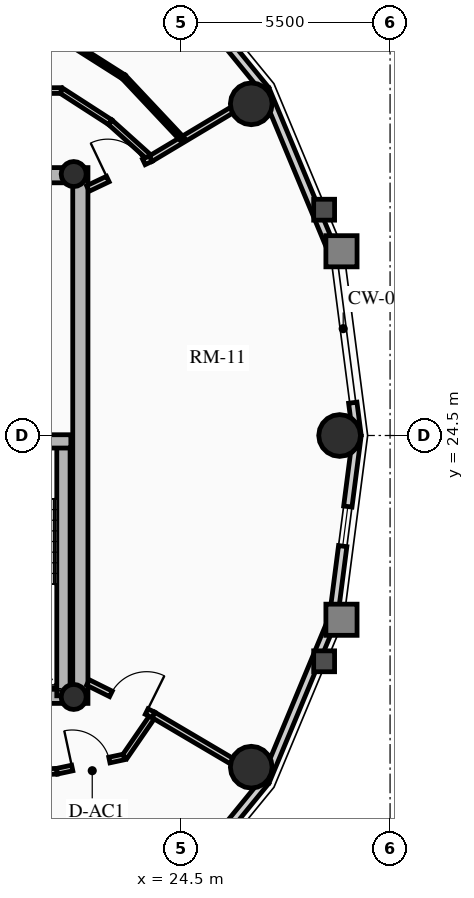
"""IFC4 building model, lengths in metres.
Left out: names, types, materials, properties, quantities, classifications, styles, units other than length and angle.
Written with IfcOpenShell. Run it as: python <this file> out.ifc"""

import sys

from ifc_helpers import new_model, si_unit, direction, frame, frame_2d, origin, origin_2d, place, context, subcontext, project, spatial, rectangle, circle, hollow_circle, extrude, source, transform, mapped, element, fill, save


model = new_model("IFC4")
c1 = context("Model", 3, precision=1e-05, world=origin(), true_north=direction((0.0, 1.0)))
c2 = subcontext(c1, "Body", "Model", "MODEL_VIEW")
j1 = project(units=[si_unit("LENGTHUNIT", "METRE"), si_unit("PLANEANGLEUNIT", "RADIAN")], contexts=[c1])
p1 = place(None, origin())
s1 = spatial("IfcSite", under=j1, at=p1, CompositionType="ELEMENT")
p2 = place(p1, origin())
s2 = spatial("IfcBuilding", under=s1, at=p2, CompositionType="ELEMENT")
p3 = place(p2, frame((0.0, 0.0, 226.05)))
s3 = spatial("IfcBuildingStorey", under=s2, at=p3, CompositionType="ELEMENT", Elevation=226.05)
p4 = place(p3, frame((21.85, 17.45, 0.0), z_axis=(0.0, 0.0, 1.0), x_axis=(0.0, 1.0, 0.0)))
e1 = element("IfcWall", 1, at=p4, inside=s3, PredefinedType="SHEAR", context=c2, shape_type="SweptSolid", body=[
    extrude(rectangle(XDim=14.1, YDim=0.4, at=frame_2d((7.05, 0.0))), origin(), (0.0, 0.0, 1.0), 3.2),
])
p5 = place(p3, frame((11.15, 17.65, 0.0), z_axis=(0.0, 0.0, 1.0), x_axis=(1.0, 0.0, 0.0)))
e2 = element("IfcWall", 2, at=p5, inside=s3, PredefinedType="SHEAR", context=c2, shape_type="SweptSolid", body=[
    extrude(rectangle(XDim=10.7, YDim=0.4, at=frame_2d((5.35, 0.0))), origin(), (0.0, 0.0, 1.0), 3.2),
])
m1 = source(origin(), c2, "Body", "SweptSolid", [
    extrude(rectangle(XDim=1.5, YDim=2.02, at=frame_2d((0.75, 1.01))), frame((0.0, 0.21, 0.0), z_axis=(0.0, -1.0, 0.0), x_axis=(1.0, 0.0, 0.0)), (0.0, 0.0, 1.0), 0.42),
])
p6 = place(p5, frame((5.45, 0.0, 0.0)))
e3 = element("IfcOpeningElement", 3, at=p6, cuts=e2, PredefinedType="OPENING", context=c2, shape_type="MappedRepresentation", body=[
    mapped(m1, transform((0.0, 0.0, 0.0), x_axis=(1.0, 0.0, 0.0), y_axis=(0.0, 1.0, 0.0), z_axis=(0.0, 0.0, 1.0), scale=1.0)),
])
p7 = place(p3, frame((11.15, 31.35, 0.0), z_axis=(0.0, 0.0, 1.0), x_axis=(1.0, 0.0, 0.0)))
e4 = element("IfcWall", 4, at=p7, inside=s3, PredefinedType="SHEAR", context=c2, shape_type="SweptSolid", body=[
    extrude(rectangle(XDim=10.7, YDim=0.4, at=frame_2d((5.35, 0.0))), origin(), (0.0, 0.0, 1.0), 3.2),
])
p8 = place(p7, frame((4.6, 0.0, 0.0)))
e5 = element("IfcOpeningElement", 5, at=p8, cuts=e4, PredefinedType="OPENING", context=c2, shape_type="MappedRepresentation", body=[
    mapped(m1, transform((0.0, 0.0, 0.0), x_axis=(1.0, 0.0, 0.0), y_axis=(0.0, 1.0, 0.0), z_axis=(0.0, 0.0, 1.0), scale=1.0)),
])
p9 = place(p3, frame((21.405, 17.65, 0.0), z_axis=(0.0, 0.0, 1.0), x_axis=(0.0, 1.0, 0.0)))
e6 = element("IfcWall", 6, at=p9, inside=s3, PredefinedType="SHEAR", context=c2, shape_type="SweptSolid", body=[
    extrude(rectangle(XDim=6.695, YDim=0.35, at=frame_2d((3.348, 0.0))), origin(), (0.0, 0.0, 1.0), 3.2),
])
p10 = place(p3, frame((18.315, 24.345, 0.0), z_axis=(0.0, 0.0, 1.0), x_axis=(1.0, 0.0, 0.0)))
e7 = element("IfcWall", 7, at=p10, inside=s3, PredefinedType="SHEAR", context=c2, shape_type="SweptSolid", body=[
    extrude(rectangle(XDim=3.285, YDim=0.35, at=frame_2d((1.643, 0.0))), origin(), (0.0, 0.0, 1.0), 3.2),
])
for number, where, z_axis, x_axis in (
    (8, (21.675, 17.62, 0.0), (0.0, 0.0, 1.0), (1.0, 0.0, 0.0)),
    (9, (21.675, 31.38, 0.0), (0.0, 0.0, 1.0), (1.0, 0.0, 0.0)),
):
    element("IfcColumn", number, at=place(p3, frame(where, z_axis=z_axis, x_axis=x_axis)), inside=s3, PredefinedType="COLUMN", context=c2, shape_type="SweptSolid", body=[
        extrude(hollow_circle(Radius=0.33, WallThickness=0.025, at=origin_2d()), origin(), (0.0, 0.0, 1.0), 3.2),
    ])
for number, where, z_axis, x_axis in (
    (10, (28.672, 24.5, 0.0), (0.0, 0.0, 1.0), (1.0, 0.0, 0.0)),
    (11, (26.347, 33.229, 0.0), (0.0, 0.0, 1.0), (1.0, 0.0, 0.0)),
    (12, (26.347, 15.771, 0.0), (0.0, 0.0, 1.0), (1.0, 0.0, 0.0)),
):
    element("IfcColumn", number, at=place(p3, frame(where, z_axis=z_axis, x_axis=x_axis)), inside=s3, PredefinedType="USERDEFINED", context=c2, shape_type="SweptSolid", body=[
        extrude(circle(Radius=0.55, at=origin_2d()), origin(), (0.0, 0.0, 1.0), 3.2),
    ])
p11 = place(p3, frame((29.018, 25.363, 0.0), z_axis=(0.0, 0.0, 1.0), x_axis=(0.128247365719, -0.991742211054, 0.0)))
e13 = element("IfcWall", 13, at=p11, inside=s3, PredefinedType="SOLIDWALL", context=c2, shape_type="SweptSolid", body=[
    extrude(rectangle(XDim=0.87, YDim=0.22, at=frame_2d((0.435, 0.0))), origin(), (0.0, 0.0, 1.0), 2.612),
])
p12 = place(p3, frame((26.718, 33.593, 0.0), z_axis=(0.0, 0.0, 1.0), x_axis=(0.384036305194, -0.923317993052, 0.0)))
e14 = element("IfcWall", 14, at=p12, inside=s3, PredefinedType="SOLIDWALL", context=c2, shape_type="SweptSolid", body=[
    extrude(rectangle(XDim=4.671, YDim=0.22, at=frame_2d((2.335, 0.0))), origin(), (0.0, 0.0, 1.0), 2.612),
])
p13 = place(p3, frame((23.924, 37.015, 0.0), z_axis=(0.0, 0.0, 1.0), x_axis=(0.632467166636, -0.774587169483, 0.0)))
e15 = element("IfcWall", 15, at=p13, inside=s3, PredefinedType="SOLIDWALL", context=c2, shape_type="SweptSolid", body=[
    extrude(rectangle(XDim=4.418, YDim=0.22, at=frame_2d((2.209, 0.0))), origin(), (0.0, 0.0, 1.0), 2.612),
])
m2 = source(origin(), c2, "Body", "SweptSolid", [
    extrude(rectangle(XDim=1.05, YDim=1.3, at=frame_2d((0.525, 0.65))), frame((0.0, 0.12, 0.0), z_axis=(0.0, -1.0, 0.0), x_axis=(1.0, 0.0, 0.0)), (0.0, 0.0, 1.0), 0.24),
])
p14 = place(p13, frame((1.684, 0.0, 0.65)))
e16 = element("IfcOpeningElement", 16, at=p14, cuts=e15, PredefinedType="OPENING", context=c2, shape_type="MappedRepresentation", body=[
    mapped(m2, transform((0.0, 0.0, 0.0), x_axis=(1.0, 0.0, 0.0), y_axis=(0.0, 1.0, 0.0), z_axis=(0.0, 0.0, 1.0), scale=1.0)),
])
p15 = place(p3, frame((26.718, 15.407, 0.0), z_axis=(0.0, 0.0, 1.0), x_axis=(-0.632467166636, -0.774587169483, 0.0)))
e17 = element("IfcWall", 17, at=p15, inside=s3, PredefinedType="SOLIDWALL", context=c2, shape_type="SweptSolid", body=[
    extrude(rectangle(XDim=4.418, YDim=0.22, at=frame_2d((2.209, 0.0))), origin(), (0.0, 0.0, 1.0), 2.612),
])
p16 = place(p15, frame((1.684, 0.0, 0.65)))
e18 = element("IfcOpeningElement", 18, at=p16, cuts=e17, PredefinedType="OPENING", context=c2, shape_type="MappedRepresentation", body=[
    mapped(m2, transform((0.0, 0.0, 0.0), x_axis=(1.0, 0.0, 0.0), y_axis=(0.0, 1.0, 0.0), z_axis=(0.0, 0.0, 1.0), scale=1.0)),
])
p17 = place(p3, frame((28.512, 19.719, 0.0), z_axis=(0.0, 0.0, 1.0), x_axis=(-0.384036305194, -0.923317993052, 0.0)))
e19 = element("IfcWall", 19, at=p17, inside=s3, PredefinedType="SOLIDWALL", context=c2, shape_type="SweptSolid", body=[
    extrude(rectangle(XDim=4.671, YDim=0.22, at=frame_2d((2.335, 0.0))), origin(), (0.0, 0.0, 1.0), 2.612),
])
p18 = place(p3, frame((29.13, 24.5, 0.0), z_axis=(0.0, 0.0, 1.0), x_axis=(-0.128241318541, -0.991742993027, 0.0)))
e20 = element("IfcWall", 20, at=p18, inside=s3, PredefinedType="SOLIDWALL", context=c2, shape_type="SweptSolid", body=[
    extrude(rectangle(XDim=4.82, YDim=0.22, at=frame_2d((2.41, 0.0))), origin(), (0.0, 0.0, 1.0), 2.612),
])
p19 = place(p18, frame((1.885, 0.0, 0.65)))
e21 = element("IfcOpeningElement", 21, at=p19, cuts=e20, PredefinedType="OPENING", context=c2, shape_type="MappedRepresentation", body=[
    mapped(m2, transform((0.0, 0.0, 0.0), x_axis=(1.0, 0.0, 0.0), y_axis=(0.0, 1.0, 0.0), z_axis=(0.0, 0.0, 1.0), scale=1.0)),
])
p20 = place(p3, frame((23.701, 31.786, 0.0), z_axis=(0.0, 0.0, 1.0), x_axis=(-0.743742806382, 0.668465883913, 0.0)))
e22 = element("IfcWall", 22, at=p20, inside=s3, PredefinedType="PARTITIONING", context=c2, shape_type="SweptSolid", body=[
    extrude(rectangle(XDim=1.434, YDim=0.15, at=frame_2d((0.717, 0.0))), origin(), (0.0, 0.0, 1.0), 2.612),
])
p21 = place(p3, frame((22.635, 32.744, 0.0), z_axis=(0.0, 0.0, 1.0), x_axis=(-0.840119270642, 0.542401706391, 0.0)))
e23 = element("IfcWall", 23, at=p21, inside=s3, PredefinedType="PARTITIONING", context=c2, shape_type="SweptSolid", body=[
    extrude(rectangle(XDim=1.538, YDim=0.15, at=frame_2d((0.769, 0.0))), origin(), (0.0, 0.0, 1.0), 2.545),
])
p22 = place(p3, frame((21.344, 33.578, 0.0), z_axis=(0.0, 0.0, 1.0), x_axis=(-0.999984243152, -0.005613684, 0.0)))
e24 = element("IfcWall", 24, at=p22, inside=s3, PredefinedType="PARTITIONING", context=c2, shape_type="SweptSolid", body=[
    extrude(rectangle(XDim=3.262, YDim=0.15, at=frame_2d((1.631, 0.0))), origin(), (0.0, 0.0, 1.0), 2.612),
])
m3 = source(origin(), c2, "Body", "SweptSolid", [
    extrude(rectangle(XDim=1.05, YDim=2.015, at=frame_2d((0.525, 1.007))), frame((0.0, 0.085, 0.0), z_axis=(0.0, -1.0, 0.0), x_axis=(1.0, 0.0, 0.0)), (0.0, 0.0, 1.0), 0.17),
])
p23 = place(p22, frame((1.599, 0.0, 0.0)))
e25 = element("IfcOpeningElement", 25, at=p23, cuts=e24, PredefinedType="OPENING", context=c2, shape_type="MappedRepresentation", body=[
    mapped(m3, transform((0.0, 0.0, 0.0), x_axis=(1.0, 0.0, 0.0), y_axis=(0.0, 1.0, 0.0), z_axis=(0.0, 0.0, 1.0), scale=1.0)),
])
p24 = place(p3, frame((14.845, 15.441, 0.0), z_axis=(0.0, 0.0, 1.0), x_axis=(0.99938794868, 0.034981824334, 0.0)))
e26 = element("IfcWall", 26, at=p24, inside=s3, PredefinedType="PARTITIONING", context=c2, shape_type="SweptSolid", body=[
    extrude(rectangle(XDim=6.393, YDim=0.15, at=frame_2d((3.196, 0.0))), origin(), (0.0, 0.0, 1.0), 2.545),
])
p25 = place(p3, frame((21.234, 15.664, 0.0), z_axis=(0.0, 0.0, 1.0), x_axis=(0.977931581182, 0.208925399431, 0.0)))
e27 = element("IfcWall", 27, at=p25, inside=s3, PredefinedType="PARTITIONING", context=c2, shape_type="SweptSolid", body=[
    extrude(rectangle(XDim=1.823, YDim=0.15, at=frame_2d((0.912, 0.0))), origin(), (0.0, 0.0, 1.0), 2.545),
])
m4 = source(origin(), c2, "Body", "SweptSolid", [
    extrude(rectangle(XDim=1.0, YDim=2.015, at=frame_2d((0.5, 1.007))), frame((0.0, 0.085, 0.0), z_axis=(0.0, -1.0, 0.0), x_axis=(1.0, 0.0, 0.0)), (0.0, 0.0, 1.0), 0.17),
])
p26 = place(p25, frame((0.412, 0.0, 0.0)))
e28 = element("IfcOpeningElement", 28, at=p26, cuts=e27, PredefinedType="OPENING", context=c2, shape_type="MappedRepresentation", body=[
    mapped(m4, transform((0.0, 0.0, 0.0), x_axis=(1.0, 0.0, 0.0), y_axis=(0.0, 1.0, 0.0), z_axis=(0.0, 0.0, 1.0), scale=1.0)),
])
p27 = place(p3, frame((23.017, 16.045, 0.0), z_axis=(0.0, 0.0, 1.0), x_axis=(0.566660656138, 0.823951273308, 0.0)))
e29 = element("IfcWall", 29, at=p27, inside=s3, PredefinedType="PARTITIONING", context=c2, shape_type="SweptSolid", body=[
    extrude(rectangle(XDim=1.336, YDim=0.15, at=frame_2d((0.668, 0.0))), origin(), (0.0, 0.0, 1.0), 2.612),
])
p28 = place(p3, frame((23.701, 31.786, 0.0), z_axis=(0.0, 0.0, 1.0), x_axis=(0.858059206709, 0.513550774298, 0.0)))
e30 = element("IfcWall", 30, at=p28, inside=s3, PredefinedType="PARTITIONING", context=c2, shape_type="SweptSolid", body=[
    extrude(rectangle(XDim=3.497, YDim=0.16, at=frame_2d((1.748, 0.0))), origin(), (0.0, 0.0, 1.0), 2.612),
])
p29 = place(p3, frame((23.774, 17.146, 0.0), z_axis=(0.0, 0.0, 1.0), x_axis=(0.861296601099, -0.508102514198, 0.0)))
e31 = element("IfcWall", 31, at=p29, inside=s3, PredefinedType="PARTITIONING", context=c2, shape_type="SweptSolid", body=[
    extrude(rectangle(XDim=3.399, YDim=0.16, at=frame_2d((1.7, 0.0))), origin(), (0.0, 0.0, 1.0), 2.612),
])
p30 = place(p3, frame((22.05, 31.0, 0.0), z_axis=(0.0, 0.0, 1.0), x_axis=(0.903013459407, 0.429612257891, 0.0)))
e32 = element("IfcWall", 32, at=p30, inside=s3, PredefinedType="PARTITIONING", context=c2, shape_type="SweptSolid", body=[
    extrude(rectangle(XDim=1.829, YDim=0.16, at=frame_2d((0.914, 0.0))), origin(), (0.0, 0.0, 1.0), 2.545),
])
m5 = source(origin(), c2, "Body", "SweptSolid", [
    extrude(rectangle(XDim=1.05, YDim=2.015, at=frame_2d((0.525, 1.007))), frame((0.0, 0.09, 0.0), z_axis=(0.0, -1.0, 0.0), x_axis=(1.0, 0.0, 0.0)), (0.0, 0.0, 1.0), 0.18),
])
p31 = place(p30, frame((0.579, 0.0, 0.0)))
e33 = element("IfcOpeningElement", 33, at=p31, cuts=e32, PredefinedType="OPENING", context=c2, shape_type="MappedRepresentation", body=[
    mapped(m5, transform((0.0, 0.0, 0.0), x_axis=(1.0, 0.0, 0.0), y_axis=(0.0, 1.0, 0.0), z_axis=(0.0, 0.0, 1.0), scale=1.0)),
])
p32 = place(p3, frame((22.05, 18.0, 0.0), z_axis=(0.0, 0.0, 1.0), x_axis=(0.896045848613, -0.443961526692, 0.0)))
e34 = element("IfcWall", 34, at=p32, inside=s3, PredefinedType="PARTITIONING", context=c2, shape_type="SweptSolid", body=[
    extrude(rectangle(XDim=1.924, YDim=0.16, at=frame_2d((0.962, 0.0))), origin(), (0.0, 0.0, 1.0), 2.545),
])
p33 = place(p32, frame((0.674, 0.0, 0.0)))
e35 = element("IfcOpeningElement", 35, at=p33, cuts=e34, PredefinedType="OPENING", context=c2, shape_type="MappedRepresentation", body=[
    mapped(m5, transform((0.0, 0.0, 0.0), x_axis=(1.0, 0.0, 0.0), y_axis=(0.0, 1.0, 0.0), z_axis=(0.0, 0.0, 1.0), scale=1.0)),
])
p34 = place(p3, frame((24.542, 32.288, 0.0), z_axis=(0.0, 0.0, 1.0), x_axis=(-0.68501091047, 0.72853280814, 0.0)))
e36 = element("IfcWall", 36, at=p34, inside=s3, PredefinedType="PARTITIONING", context=c2, shape_type="SweptSolid", body=[
    extrude(rectangle(XDim=2.261, YDim=0.125, at=frame_2d((1.13, 0.0))), origin(), (0.0, 0.0, 1.0), 2.612),
])
p35 = place(p3, frame((22.993, 33.935, 0.0), z_axis=(0.0, 0.0, 1.0), x_axis=(-0.844312558894, 0.535851008112, 0.0)))
e37 = element("IfcWall", 37, at=p35, inside=s3, PredefinedType="PARTITIONING", context=c2, shape_type="SweptSolid", body=[
    extrude(rectangle(XDim=2.268, YDim=0.125, at=frame_2d((1.134, 0.0))), origin(), (0.0, 0.0, 1.0), 2.545),
])
m6 = source(origin(), c2, "Body", "SweptSolid", [
    extrude(rectangle(XDim=1.05, YDim=1.3, at=frame_2d((0.525, 0.65))), frame((0.0, 0.03, 0.0), z_axis=(0.0, -1.0, 0.0), x_axis=(1.0, 0.0, 0.0)), (0.0, 0.0, 1.0), 0.06),
])
p36 = place(p19, origin())
e38 = element("IfcWindow", 38, at=p36, inside=s3, PartitioningType="SINGLE_PANEL", PredefinedType="WINDOW", context=c2, shape_type="MappedRepresentation", body=[
    mapped(m6, transform((0.0, 0.0, 0.0), x_axis=(1.0, 0.0, 0.0), y_axis=(0.0, 1.0, 0.0), z_axis=(0.0, 0.0, 1.0), scale=1.0)),
])
fill(e21, e38)
m7 = source(origin(), c2, "Body", "SweptSolid", [
    extrude(rectangle(XDim=1.05, YDim=2.015, at=frame_2d((0.525, 1.007))), frame((0.0, 0.025, 0.0), z_axis=(0.0, -1.0, 0.0), x_axis=(1.0, 0.0, 0.0)), (0.0, 0.0, 1.0), 0.05),
])
p37 = place(p31, origin())
e39 = element("IfcDoor", 39, at=p37, inside=s3, OperationType="SINGLE_SWING_LEFT", PredefinedType="DOOR", context=c2, shape_type="MappedRepresentation", body=[
    mapped(m7, transform((0.0, 0.0, 0.0), x_axis=(1.0, 0.0, 0.0), y_axis=(0.0, 1.0, 0.0), z_axis=(0.0, 0.0, 1.0), scale=1.0)),
])
fill(e33, e39)
p38 = place(p33, origin())
e40 = element("IfcDoor", 40, at=p38, inside=s3, OperationType="SINGLE_SWING_RIGHT", PredefinedType="DOOR", context=c2, shape_type="MappedRepresentation", body=[
    mapped(m7, transform((0.0, 0.0, 0.0), x_axis=(1.0, 0.0, 0.0), y_axis=(0.0, 1.0, 0.0), z_axis=(0.0, 0.0, 1.0), scale=1.0)),
])
fill(e35, e40)
m8 = source(origin(), c2, "Body", "SweptSolid", [
    extrude(rectangle(XDim=1.0, YDim=2.015, at=frame_2d((0.5, 1.007))), frame((0.0, 0.025, 0.0), z_axis=(0.0, -1.0, 0.0), x_axis=(1.0, 0.0, 0.0)), (0.0, 0.0, 1.0), 0.05),
])
p39 = place(p26, origin())
e41 = element("IfcDoor", 41, at=p39, inside=s3, OperationType="SINGLE_SWING_LEFT", PredefinedType="DOOR", context=c2, shape_type="MappedRepresentation", body=[
    mapped(m8, transform((0.0, 0.0, 0.0), x_axis=(1.0, 0.0, 0.0), y_axis=(0.0, 1.0, 0.0), z_axis=(0.0, 0.0, 1.0), scale=1.0)),
])
fill(e28, e41)
save(model, sys.argv[1])
